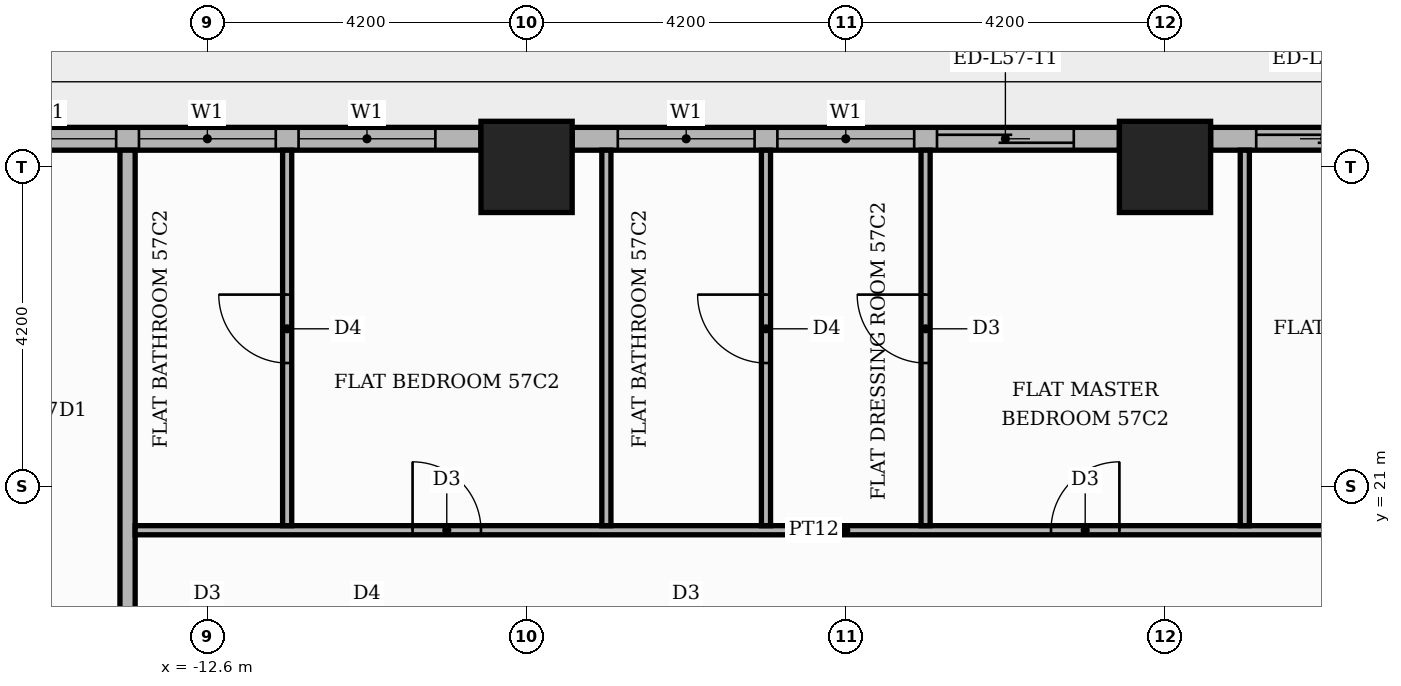
"""IFC4 building model, lengths in metres.
Left out: names, types, materials, properties, quantities, classifications, styles, units other than length and angle.
Written with IfcOpenShell. Run it as: python <this file> out.ifc"""

import sys

from ifc_helpers import new_model, si_unit, direction, frame, frame_2d, origin, origin_2d, place, context, subcontext, project, spatial, rectangle, extrude, element, fill, save


model = new_model("IFC4")
c1 = context("Model", 3, precision=1e-05, world=origin(), true_north=direction((0.0, 1.0)))
c2 = subcontext(c1, "Body", "Model", "MODEL_VIEW")
j1 = project(units=[si_unit("LENGTHUNIT", "METRE"), si_unit("PLANEANGLEUNIT", "RADIAN")], contexts=[c1])
p1 = place(None, origin())
s1 = spatial("IfcSite", under=j1, at=p1, CompositionType="ELEMENT")
p2 = place(p1, origin())
s2 = spatial("IfcBuilding", under=s1, at=p2, CompositionType="ELEMENT")
p3 = place(p2, frame((0.0, 0.0, 240.6)))
s3 = spatial("IfcBuildingStorey", under=s2, at=p3, CompositionType="ELEMENT", Elevation=240.6)
for number, where, z_axis, x_axis in (
    (1, (0.0, 25.2, 0.0), (0.0, 0.0, 1.0), (1.0, 0.0, 0.0)),
    (2, (-8.4, 25.2, 0.0), (0.0, 0.0, 1.0), (1.0, 0.0, 0.0)),
):
    element("IfcColumn", number, at=place(p3, frame(where, z_axis=z_axis, x_axis=x_axis)), inside=s3, PredefinedType="COLUMN", context=c2, shape_type="SweptSolid", body=[
        extrude(rectangle(XDim=1.2, YDim=1.2, at=origin_2d()), origin(), (0.0, 0.0, 1.0), 3.9),
    ])
p4 = place(p3, frame((7.8, 25.57, 0.0), z_axis=(0.0, 0.0, 1.0), x_axis=(-1.0, 0.0, 0.0)))
e3 = element("IfcWall", 3, at=p4, inside=s3, PredefinedType="STANDARD", context=c2, shape_type="SweptSolid", body=[
    extrude(rectangle(XDim=7.2, YDim=0.3, at=frame_2d((3.6, 0.0))), origin(), (0.0, 0.0, 1.0), 3.48),
])
p5 = place(p4, frame((0.6, 0.0, 0.9)))
e4 = element("IfcOpeningElement", 4, at=p5, cuts=e3, PredefinedType="OPENING", context=c2, shape_type="SweptSolid", body=[
    extrude(rectangle(XDim=1.8, YDim=2.1, at=frame_2d((0.9, 1.05))), frame((0.0, 0.16, 0.0), z_axis=(0.0, -1.0, 0.0), x_axis=(1.0, 0.0, 0.0)), (0.0, 0.0, 1.0), 0.32),
])
p6 = place(p4, frame((2.7, 0.0, 0.9)))
e5 = element("IfcOpeningElement", 5, at=p6, cuts=e3, PredefinedType="OPENING", context=c2, shape_type="SweptSolid", body=[
    extrude(rectangle(XDim=1.8, YDim=2.1, at=frame_2d((0.9, 1.05))), frame((0.0, 0.16, 0.0), z_axis=(0.0, -1.0, 0.0), x_axis=(1.0, 0.0, 0.0)), (0.0, 0.0, 1.0), 0.32),
])
p7 = place(p4, frame((4.8, 0.0, 0.0)))
e6 = element("IfcOpeningElement", 6, at=p7, cuts=e3, PredefinedType="OPENING", context=c2, shape_type="SweptSolid", body=[
    extrude(rectangle(XDim=1.8, YDim=2.4, at=frame_2d((0.9, 1.2))), frame((0.0, 0.16, 0.0), z_axis=(0.0, -1.0, 0.0), x_axis=(1.0, 0.0, 0.0)), (0.0, 0.0, 1.0), 0.32),
])
p8 = place(p3, frame((-0.6, 25.57, 0.0), z_axis=(0.0, 0.0, 1.0), x_axis=(-1.0, 0.0, 0.0)))
e7 = element("IfcWall", 7, at=p8, inside=s3, PredefinedType="STANDARD", context=c2, shape_type="SweptSolid", body=[
    extrude(rectangle(XDim=7.2, YDim=0.3, at=frame_2d((3.6, 0.0))), origin(), (0.0, 0.0, 1.0), 3.48),
])
p9 = place(p8, frame((0.6, 0.0, 0.0)))
e8 = element("IfcOpeningElement", 8, at=p9, cuts=e7, PredefinedType="OPENING", context=c2, shape_type="SweptSolid", body=[
    extrude(rectangle(XDim=1.8, YDim=2.4, at=frame_2d((0.9, 1.2))), frame((0.0, 0.16, 0.0), z_axis=(0.0, -1.0, 0.0), x_axis=(1.0, 0.0, 0.0)), (0.0, 0.0, 1.0), 0.32),
])
p10 = place(p8, frame((2.7, 0.0, 0.9)))
e9 = element("IfcOpeningElement", 9, at=p10, cuts=e7, PredefinedType="OPENING", context=c2, shape_type="SweptSolid", body=[
    extrude(rectangle(XDim=1.8, YDim=2.1, at=frame_2d((0.9, 1.05))), frame((0.0, 0.16, 0.0), z_axis=(0.0, -1.0, 0.0), x_axis=(1.0, 0.0, 0.0)), (0.0, 0.0, 1.0), 0.32),
])
p11 = place(p8, frame((4.8, 0.0, 0.9)))
e10 = element("IfcOpeningElement", 10, at=p11, cuts=e7, PredefinedType="OPENING", context=c2, shape_type="SweptSolid", body=[
    extrude(rectangle(XDim=1.8, YDim=2.1, at=frame_2d((0.9, 1.05))), frame((0.0, 0.16, 0.0), z_axis=(0.0, -1.0, 0.0), x_axis=(1.0, 0.0, 0.0)), (0.0, 0.0, 1.0), 0.32),
])
p12 = place(p3, frame((-9.0, 25.57, 0.0), z_axis=(0.0, 0.0, 1.0), x_axis=(-1.0, 0.0, 0.0)))
e11 = element("IfcWall", 11, at=p12, inside=s3, PredefinedType="STANDARD", context=c2, shape_type="SweptSolid", body=[
    extrude(rectangle(XDim=7.2, YDim=0.3, at=frame_2d((3.6, 0.0))), origin(), (0.0, 0.0, 1.0), 3.48),
])
p13 = place(p12, frame((0.6, 0.0, 0.9)))
e12 = element("IfcOpeningElement", 12, at=p13, cuts=e11, PredefinedType="OPENING", context=c2, shape_type="SweptSolid", body=[
    extrude(rectangle(XDim=1.8, YDim=2.1, at=frame_2d((0.9, 1.05))), frame((0.0, 0.16, 0.0), z_axis=(0.0, -1.0, 0.0), x_axis=(1.0, 0.0, 0.0)), (0.0, 0.0, 1.0), 0.32),
])
p14 = place(p12, frame((2.7, 0.0, 0.9)))
e13 = element("IfcOpeningElement", 13, at=p14, cuts=e11, PredefinedType="OPENING", context=c2, shape_type="SweptSolid", body=[
    extrude(rectangle(XDim=1.8, YDim=2.1, at=frame_2d((0.9, 1.05))), frame((0.0, 0.16, 0.0), z_axis=(0.0, -1.0, 0.0), x_axis=(1.0, 0.0, 0.0)), (0.0, 0.0, 1.0), 0.32),
])
p15 = place(p12, frame((4.8, 0.0, 0.9)))
e14 = element("IfcOpeningElement", 14, at=p15, cuts=e11, PredefinedType="OPENING", context=c2, shape_type="SweptSolid", body=[
    extrude(rectangle(XDim=1.8, YDim=2.1, at=frame_2d((0.9, 1.05))), frame((0.0, 0.16, 0.0), z_axis=(0.0, -1.0, 0.0), x_axis=(1.0, 0.0, 0.0)), (0.0, 0.0, 1.0), 0.32),
])
p16 = place(p3, frame((-13.65, 13.75, 0.0), z_axis=(0.0, 0.0, 1.0), x_axis=(0.0, 1.0, 0.0)))
e15 = element("IfcWall", 15, at=p16, inside=s3, PredefinedType="PARTITIONING", context=c2, shape_type="SweptSolid", body=[
    extrude(rectangle(XDim=11.67, YDim=0.2, at=frame_2d((5.835, 0.0))), origin(), (0.0, 0.0, 1.0), 3.48),
])
p17 = place(p3, frame((-13.55, 20.42, 0.0), z_axis=(0.0, 0.0, 1.0), x_axis=(1.0, 0.0, 0.0)))
e16 = element("IfcWall", 16, at=p17, inside=s3, PredefinedType="PARTITIONING", context=c2, shape_type="SweptSolid", body=[
    extrude(rectangle(XDim=18.7, YDim=0.12, at=frame_2d((9.35, 0.0))), origin(), (0.0, 0.0, 1.0), 3.48),
])
p18 = place(p17, frame((16.2, 0.0, 0.0)))
e17 = element("IfcOpeningElement", 17, at=p18, cuts=e16, PredefinedType="OPENING", context=c2, shape_type="SweptSolid", body=[
    extrude(rectangle(XDim=1.0, YDim=2.1, at=frame_2d((0.5, 1.05))), frame((0.0, 0.07, 0.0), z_axis=(0.0, -1.0, 0.0), x_axis=(1.0, 0.0, 0.0)), (0.0, 0.0, 1.0), 0.14),
])
p19 = place(p17, frame((12.05, 0.0, 0.0)))
e18 = element("IfcOpeningElement", 18, at=p19, cuts=e16, PredefinedType="OPENING", context=c2, shape_type="SweptSolid", body=[
    extrude(rectangle(XDim=0.9, YDim=2.1, at=frame_2d((0.45, 1.05))), frame((0.0, 0.07, 0.0), z_axis=(0.0, -1.0, 0.0), x_axis=(1.0, 0.0, 0.0)), (0.0, 0.0, 1.0), 0.14),
])
p20 = place(p17, frame((3.65, 0.0, 0.0)))
e19 = element("IfcOpeningElement", 19, at=p20, cuts=e16, PredefinedType="OPENING", context=c2, shape_type="SweptSolid", body=[
    extrude(rectangle(XDim=0.9, YDim=2.1, at=frame_2d((0.45, 1.05))), frame((0.0, 0.07, 0.0), z_axis=(0.0, -1.0, 0.0), x_axis=(1.0, 0.0, 0.0)), (0.0, 0.0, 1.0), 0.14),
])
p21 = place(p3, frame((-11.55, 20.48, 0.0), z_axis=(0.0, 0.0, 1.0), x_axis=(0.0, 1.0, 0.0)))
e20 = element("IfcWall", 20, at=p21, inside=s3, PredefinedType="PARTITIONING", context=c2, shape_type="SweptSolid", body=[
    extrude(rectangle(XDim=4.94, YDim=0.12, at=frame_2d((2.47, 0.0))), origin(), (0.0, 0.0, 1.0), 3.48),
])
p22 = place(p21, frame((2.14, 0.0, 0.0)))
e21 = element("IfcOpeningElement", 21, at=p22, cuts=e20, PredefinedType="OPENING", context=c2, shape_type="SweptSolid", body=[
    extrude(rectangle(XDim=0.9, YDim=2.1, at=frame_2d((0.45, 1.05))), frame((0.0, 0.07, 0.0), z_axis=(0.0, -1.0, 0.0), x_axis=(1.0, 0.0, 0.0)), (0.0, 0.0, 1.0), 0.14),
])
p23 = place(p3, frame((-7.35, 20.48, 0.0), z_axis=(0.0, 0.0, 1.0), x_axis=(0.0, 1.0, 0.0)))
e22 = element("IfcWall", 22, at=p23, inside=s3, PredefinedType="PARTITIONING", context=c2, shape_type="SweptSolid", body=[
    extrude(rectangle(XDim=4.94, YDim=0.12, at=frame_2d((2.47, 0.0))), origin(), (0.0, 0.0, 1.0), 3.48),
])
p24 = place(p3, frame((-5.25, 20.48, 0.0), z_axis=(0.0, 0.0, 1.0), x_axis=(0.0, 1.0, 0.0)))
e23 = element("IfcWall", 23, at=p24, inside=s3, PredefinedType="PARTITIONING", context=c2, shape_type="SweptSolid", body=[
    extrude(rectangle(XDim=4.94, YDim=0.12, at=frame_2d((2.47, 0.0))), origin(), (0.0, 0.0, 1.0), 3.48),
])
p25 = place(p24, frame((2.14, 0.0, 0.0)))
e24 = element("IfcOpeningElement", 24, at=p25, cuts=e23, PredefinedType="OPENING", context=c2, shape_type="SweptSolid", body=[
    extrude(rectangle(XDim=0.9, YDim=2.1, at=frame_2d((0.45, 1.05))), frame((0.0, 0.07, 0.0), z_axis=(0.0, -1.0, 0.0), x_axis=(1.0, 0.0, 0.0)), (0.0, 0.0, 1.0), 0.14),
])
p26 = place(p3, frame((-3.15, 20.48, 0.0), z_axis=(0.0, 0.0, 1.0), x_axis=(0.0, 1.0, 0.0)))
e25 = element("IfcWall", 25, at=p26, inside=s3, PredefinedType="PARTITIONING", context=c2, shape_type="SweptSolid", body=[
    extrude(rectangle(XDim=4.94, YDim=0.12, at=frame_2d((2.47, 0.0))), origin(), (0.0, 0.0, 1.0), 3.48),
])
p27 = place(p26, frame((2.14, 0.0, 0.0)))
e26 = element("IfcOpeningElement", 26, at=p27, cuts=e25, PredefinedType="OPENING", context=c2, shape_type="SweptSolid", body=[
    extrude(rectangle(XDim=0.9, YDim=2.1, at=frame_2d((0.45, 1.05))), frame((0.0, 0.07, 0.0), z_axis=(0.0, -1.0, 0.0), x_axis=(1.0, 0.0, 0.0)), (0.0, 0.0, 1.0), 0.14),
])
p28 = place(p3, frame((1.05, 20.48, 0.0), z_axis=(0.0, 0.0, 1.0), x_axis=(0.0, 1.0, 0.0)))
e27 = element("IfcWall", 27, at=p28, inside=s3, PredefinedType="PARTITIONING", context=c2, shape_type="SweptSolid", body=[
    extrude(rectangle(XDim=4.94, YDim=0.12, at=frame_2d((2.47, 0.0))), origin(), (0.0, 0.0, 1.0), 3.48),
])
p29 = place(p7, origin())
e28 = element("IfcDoor", 28, at=p29, inside=s3, OperationType="SLIDING_TO_RIGHT", PredefinedType="DOOR", context=c2, shape_type="SweptSolid", body=[
    extrude(rectangle(XDim=1.8, YDim=2.4, at=frame_2d((0.9, 1.2))), frame((0.0, 0.025, 0.0), z_axis=(0.0, -1.0, 0.0), x_axis=(1.0, 0.0, 0.0)), (0.0, 0.0, 1.0), 0.05),
])
fill(e6, e28)
p30 = place(p9, origin())
e29 = element("IfcDoor", 29, at=p30, inside=s3, OperationType="SLIDING_TO_LEFT", PredefinedType="DOOR", context=c2, shape_type="SweptSolid", body=[
    extrude(rectangle(XDim=1.8, YDim=2.4, at=frame_2d((0.9, 1.2))), frame((0.0, 0.025, 0.0), z_axis=(0.0, -1.0, 0.0), x_axis=(1.0, 0.0, 0.0)), (0.0, 0.0, 1.0), 0.05),
])
fill(e8, e29)
p31 = place(p10, origin())
e30 = element("IfcWindow", 30, at=p31, inside=s3, PartitioningType="SINGLE_PANEL", PredefinedType="WINDOW", context=c2, shape_type="SweptSolid", body=[
    extrude(rectangle(XDim=1.8, YDim=2.1, at=frame_2d((0.9, 1.05))), frame((0.0, 0.03, 0.0), z_axis=(0.0, -1.0, 0.0), x_axis=(1.0, 0.0, 0.0)), (0.0, 0.0, 1.0), 0.06),
])
fill(e9, e30)
p32 = place(p11, origin())
e31 = element("IfcWindow", 31, at=p32, inside=s3, PartitioningType="SINGLE_PANEL", PredefinedType="WINDOW", context=c2, shape_type="SweptSolid", body=[
    extrude(rectangle(XDim=1.8, YDim=2.1, at=frame_2d((0.9, 1.05))), frame((0.0, 0.03, 0.0), z_axis=(0.0, -1.0, 0.0), x_axis=(1.0, 0.0, 0.0)), (0.0, 0.0, 1.0), 0.06),
])
fill(e10, e31)
p33 = place(p13, origin())
e32 = element("IfcWindow", 32, at=p33, inside=s3, PartitioningType="SINGLE_PANEL", PredefinedType="WINDOW", context=c2, shape_type="SweptSolid", body=[
    extrude(rectangle(XDim=1.8, YDim=2.1, at=frame_2d((0.9, 1.05))), frame((0.0, 0.03, 0.0), z_axis=(0.0, -1.0, 0.0), x_axis=(1.0, 0.0, 0.0)), (0.0, 0.0, 1.0), 0.06),
])
fill(e12, e32)
p34 = place(p14, origin())
e33 = element("IfcWindow", 33, at=p34, inside=s3, PartitioningType="SINGLE_PANEL", PredefinedType="WINDOW", context=c2, shape_type="SweptSolid", body=[
    extrude(rectangle(XDim=1.8, YDim=2.1, at=frame_2d((0.9, 1.05))), frame((0.0, 0.03, 0.0), z_axis=(0.0, -1.0, 0.0), x_axis=(1.0, 0.0, 0.0)), (0.0, 0.0, 1.0), 0.06),
])
fill(e13, e33)
p35 = place(p15, origin())
e34 = element("IfcWindow", 34, at=p35, inside=s3, PartitioningType="SINGLE_PANEL", PredefinedType="WINDOW", context=c2, shape_type="SweptSolid", body=[
    extrude(rectangle(XDim=1.8, YDim=2.1, at=frame_2d((0.9, 1.05))), frame((0.0, 0.03, 0.0), z_axis=(0.0, -1.0, 0.0), x_axis=(1.0, 0.0, 0.0)), (0.0, 0.0, 1.0), 0.06),
])
fill(e14, e34)
p36 = place(p19, origin())
e35 = element("IfcDoor", 35, at=p36, inside=s3, OperationType="SINGLE_SWING_RIGHT", PredefinedType="DOOR", context=c2, shape_type="SweptSolid", body=[
    extrude(rectangle(XDim=0.9, YDim=2.1, at=frame_2d((0.45, 1.05))), frame((0.0, 0.025, 0.0), z_axis=(0.0, -1.0, 0.0), x_axis=(1.0, 0.0, 0.0)), (0.0, 0.0, 1.0), 0.05),
])
fill(e18, e35)
p37 = place(p27, origin())
e36 = element("IfcDoor", 36, at=p37, inside=s3, OperationType="SINGLE_SWING_RIGHT", PredefinedType="DOOR", context=c2, shape_type="SweptSolid", body=[
    extrude(rectangle(XDim=0.9, YDim=2.1, at=frame_2d((0.45, 1.05))), frame((0.0, 0.025, 0.0), z_axis=(0.0, -1.0, 0.0), x_axis=(1.0, 0.0, 0.0)), (0.0, 0.0, 1.0), 0.05),
])
fill(e26, e36)
p38 = place(p25, origin())
e37 = element("IfcDoor", 37, at=p38, inside=s3, OperationType="SINGLE_SWING_RIGHT", PredefinedType="DOOR", context=c2, shape_type="SweptSolid", body=[
    extrude(rectangle(XDim=0.9, YDim=2.1, at=frame_2d((0.45, 1.05))), frame((0.0, 0.025, 0.0), z_axis=(0.0, -1.0, 0.0), x_axis=(1.0, 0.0, 0.0)), (0.0, 0.0, 1.0), 0.05),
])
fill(e24, e37)
p39 = place(p20, origin())
e38 = element("IfcDoor", 38, at=p39, inside=s3, OperationType="SINGLE_SWING_LEFT", PredefinedType="DOOR", context=c2, shape_type="SweptSolid", body=[
    extrude(rectangle(XDim=0.9, YDim=2.1, at=frame_2d((0.45, 1.05))), frame((0.0, 0.025, 0.0), z_axis=(0.0, -1.0, 0.0), x_axis=(1.0, 0.0, 0.0)), (0.0, 0.0, 1.0), 0.05),
])
fill(e19, e38)
p40 = place(p22, origin())
e39 = element("IfcDoor", 39, at=p40, inside=s3, OperationType="SINGLE_SWING_RIGHT", PredefinedType="DOOR", context=c2, shape_type="SweptSolid", body=[
    extrude(rectangle(XDim=0.9, YDim=2.1, at=frame_2d((0.45, 1.05))), frame((0.0, 0.025, 0.0), z_axis=(0.0, -1.0, 0.0), x_axis=(1.0, 0.0, 0.0)), (0.0, 0.0, 1.0), 0.05),
])
fill(e21, e39)
save(model, sys.argv[1])
